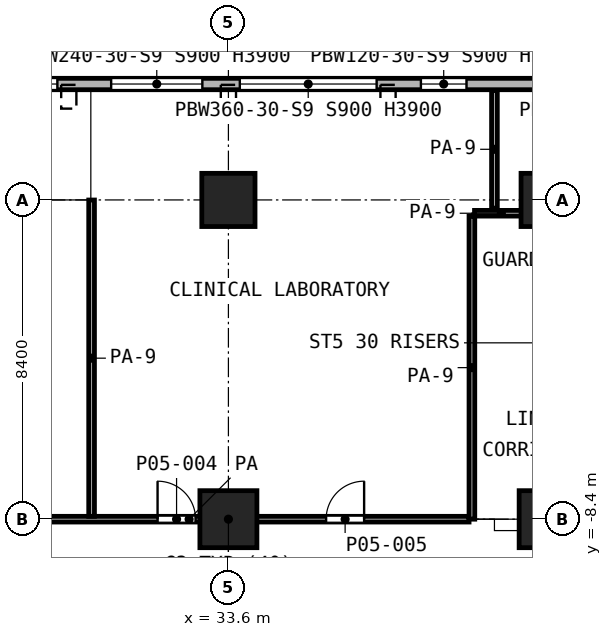
"""IFC4 building model, lengths in metres.
Left out: names, types, materials, properties, quantities, classifications, styles, units other than length and angle.
Written with IfcOpenShell. Run it as: python <this file> out.ifc"""

import sys

from ifc_helpers import new_model, si_unit, direction, frame, frame_2d, origin, origin_2d, place, context, subcontext, project, spatial, rectangle, extrude, element, fill, save


model = new_model("IFC4")
c1 = context("Model", 3, precision=1e-05, world=origin(), true_north=direction((0.0, 1.0)))
c2 = subcontext(c1, "Body", "Model", "MODEL_VIEW")
j1 = project(units=[si_unit("LENGTHUNIT", "METRE"), si_unit("PLANEANGLEUNIT", "RADIAN")], contexts=[c1])
p1 = place(None, origin())
s1 = spatial("IfcSite", under=j1, at=p1, CompositionType="ELEMENT")
p2 = place(p1, origin())
s2 = spatial("IfcBuilding", under=s1, at=p2, CompositionType="ELEMENT")
p3 = place(p2, frame((0.0, 0.0, 23.8)))
s3 = spatial("IfcBuildingStorey", under=s2, at=p3, CompositionType="ELEMENT", Elevation=23.8)
for number, where, z_axis, x_axis in (
    (1, (33.6, 0.0, 0.0), (0.0, 0.0, 1.0), (1.0, 0.0, 0.0)),
    (2, (42.0, 0.0, 0.0), (0.0, 0.0, 1.0), (1.0, 0.0, 0.0)),
):
    element("IfcColumn", number, at=place(p3, frame(where, z_axis=z_axis, x_axis=x_axis)), inside=s3, PredefinedType="COLUMN", context=c2, shape_type="SweptSolid", body=[
        extrude(rectangle(XDim=1.4, YDim=1.4, at=origin_2d()), origin(), (0.0, 0.0, 1.0), 5.2),
    ])
for number, where, z_axis, x_axis in (
    (3, (33.6, -8.4, 0.0), (0.0, 0.0, 1.0), (1.0, 0.0, 0.0)),
    (4, (42.0, -8.4, 0.0), (0.0, 0.0, 1.0), (1.0, 0.0, 0.0)),
):
    element("IfcColumn", number, at=place(p3, frame(where, z_axis=z_axis, x_axis=x_axis)), inside=s3, PredefinedType="COLUMN", context=c2, shape_type="SweptSolid", body=[
        extrude(rectangle(XDim=1.5, YDim=1.5, at=origin_2d()), origin(), (0.0, 0.0, 1.0), 5.2),
    ])
p4 = place(p3, frame((89.538, 3.05, 0.0), z_axis=(0.0, 0.0, 1.0), x_axis=(-1.0, 0.0, 0.0)))
e5 = element("IfcWall", 5, at=p4, inside=s3, PredefinedType="SOLIDWALL", context=c2, shape_type="SweptSolid", body=[
    extrude(rectangle(XDim=86.676, YDim=0.3, at=frame_2d((43.338, 0.0))), origin(), (0.0, 0.0, 1.0), 4.85),
])
p5 = place(p4, frame((1.638, 0.0, 0.9)))
e6 = element("IfcOpeningElement", 6, at=p5, cuts=e5, PredefinedType="OPENING", context=c2, shape_type="SweptSolid", body=[
    extrude(rectangle(XDim=3.6, YDim=3.0, at=frame_2d((1.8, 1.5))), frame((0.0, 0.16, 0.0), z_axis=(0.0, -1.0, 0.0), x_axis=(1.0, 0.0, 0.0)), (0.0, 0.0, 1.0), 0.32),
])
p6 = place(p4, frame((5.838, 0.0, 0.9)))
e7 = element("IfcOpeningElement", 7, at=p6, cuts=e5, PredefinedType="OPENING", context=c2, shape_type="SweptSolid", body=[
    extrude(rectangle(XDim=3.6, YDim=3.0, at=frame_2d((1.8, 1.5))), frame((0.0, 0.16, 0.0), z_axis=(0.0, -1.0, 0.0), x_axis=(1.0, 0.0, 0.0)), (0.0, 0.0, 1.0), 0.32),
])
p7 = place(p4, frame((10.723, 0.0, 0.9)))
e8 = element("IfcOpeningElement", 8, at=p7, cuts=e5, PredefinedType="OPENING", context=c2, shape_type="SweptSolid", body=[
    extrude(rectangle(XDim=2.4, YDim=3.0, at=frame_2d((1.2, 1.5))), frame((0.0, 0.16, 0.0), z_axis=(0.0, -1.0, 0.0), x_axis=(1.0, 0.0, 0.0)), (0.0, 0.0, 1.0), 0.32),
])
p8 = place(p4, frame((14.623, 0.0, 0.9)))
e9 = element("IfcOpeningElement", 9, at=p8, cuts=e5, PredefinedType="OPENING", context=c2, shape_type="SweptSolid", body=[
    extrude(rectangle(XDim=2.4, YDim=3.0, at=frame_2d((1.2, 1.5))), frame((0.0, 0.16, 0.0), z_axis=(0.0, -1.0, 0.0), x_axis=(1.0, 0.0, 0.0)), (0.0, 0.0, 1.0), 0.32),
])
p9 = place(p4, frame((18.438, 0.0, 0.9)))
e10 = element("IfcOpeningElement", 10, at=p9, cuts=e5, PredefinedType="OPENING", context=c2, shape_type="SweptSolid", body=[
    extrude(rectangle(XDim=3.6, YDim=3.0, at=frame_2d((1.8, 1.5))), frame((0.0, 0.16, 0.0), z_axis=(0.0, -1.0, 0.0), x_axis=(1.0, 0.0, 0.0)), (0.0, 0.0, 1.0), 0.32),
])
p10 = place(p4, frame((22.638, 0.0, 0.9)))
e11 = element("IfcOpeningElement", 11, at=p10, cuts=e5, PredefinedType="OPENING", context=c2, shape_type="SweptSolid", body=[
    extrude(rectangle(XDim=3.6, YDim=3.0, at=frame_2d((1.8, 1.5))), frame((0.0, 0.16, 0.0), z_axis=(0.0, -1.0, 0.0), x_axis=(1.0, 0.0, 0.0)), (0.0, 0.0, 1.0), 0.32),
])
p11 = place(p4, frame((26.838, 0.0, 0.9)))
e12 = element("IfcOpeningElement", 12, at=p11, cuts=e5, PredefinedType="OPENING", context=c2, shape_type="SweptSolid", body=[
    extrude(rectangle(XDim=3.6, YDim=3.0, at=frame_2d((1.8, 1.5))), frame((0.0, 0.16, 0.0), z_axis=(0.0, -1.0, 0.0), x_axis=(1.0, 0.0, 0.0)), (0.0, 0.0, 1.0), 0.32),
])
p12 = place(p4, frame((31.038, 0.0, 0.9)))
e13 = element("IfcOpeningElement", 13, at=p12, cuts=e5, PredefinedType="OPENING", context=c2, shape_type="SweptSolid", body=[
    extrude(rectangle(XDim=3.6, YDim=3.0, at=frame_2d((1.8, 1.5))), frame((0.0, 0.16, 0.0), z_axis=(0.0, -1.0, 0.0), x_axis=(1.0, 0.0, 0.0)), (0.0, 0.0, 1.0), 0.32),
])
p13 = place(p4, frame((35.238, 0.0, 0.9)))
e14 = element("IfcOpeningElement", 14, at=p13, cuts=e5, PredefinedType="OPENING", context=c2, shape_type="SweptSolid", body=[
    extrude(rectangle(XDim=3.6, YDim=3.0, at=frame_2d((1.8, 1.5))), frame((0.0, 0.16, 0.0), z_axis=(0.0, -1.0, 0.0), x_axis=(1.0, 0.0, 0.0)), (0.0, 0.0, 1.0), 0.32),
])
p14 = place(p4, frame((39.438, 0.0, 0.9)))
e15 = element("IfcOpeningElement", 15, at=p14, cuts=e5, PredefinedType="OPENING", context=c2, shape_type="SweptSolid", body=[
    extrude(rectangle(XDim=3.6, YDim=3.0, at=frame_2d((1.8, 1.5))), frame((0.0, 0.16, 0.0), z_axis=(0.0, -1.0, 0.0), x_axis=(1.0, 0.0, 0.0)), (0.0, 0.0, 1.0), 0.32),
])
p15 = place(p4, frame((43.638, 0.0, 0.9)))
e16 = element("IfcOpeningElement", 16, at=p15, cuts=e5, PredefinedType="OPENING", context=c2, shape_type="SweptSolid", body=[
    extrude(rectangle(XDim=3.6, YDim=3.0, at=frame_2d((1.8, 1.5))), frame((0.0, 0.16, 0.0), z_axis=(0.0, -1.0, 0.0), x_axis=(1.0, 0.0, 0.0)), (0.0, 0.0, 1.0), 0.32),
])
p16 = place(p4, frame((49.673, 0.0, 0.9)))
e17 = element("IfcOpeningElement", 17, at=p16, cuts=e5, PredefinedType="OPENING", context=c2, shape_type="SweptSolid", body=[
    extrude(rectangle(XDim=1.2, YDim=3.0, at=frame_2d((0.6, 1.5))), frame((0.0, 0.16, 0.0), z_axis=(0.0, -1.0, 0.0), x_axis=(1.0, 0.0, 0.0)), (0.0, 0.0, 1.0), 0.32),
])
p17 = place(p4, frame((52.038, 0.0, 0.9)))
e18 = element("IfcOpeningElement", 18, at=p17, cuts=e5, PredefinedType="OPENING", context=c2, shape_type="SweptSolid", body=[
    extrude(rectangle(XDim=3.6, YDim=3.0, at=frame_2d((1.8, 1.5))), frame((0.0, 0.16, 0.0), z_axis=(0.0, -1.0, 0.0), x_axis=(1.0, 0.0, 0.0)), (0.0, 0.0, 1.0), 0.32),
])
p18 = place(p4, frame((56.623, 0.0, 0.9)))
e19 = element("IfcOpeningElement", 19, at=p18, cuts=e5, PredefinedType="OPENING", context=c2, shape_type="SweptSolid", body=[
    extrude(rectangle(XDim=2.4, YDim=3.0, at=frame_2d((1.2, 1.5))), frame((0.0, 0.16, 0.0), z_axis=(0.0, -1.0, 0.0), x_axis=(1.0, 0.0, 0.0)), (0.0, 0.0, 1.0), 0.32),
])
p19 = place(p4, frame((60.438, 0.0, 0.9)))
e20 = element("IfcOpeningElement", 20, at=p19, cuts=e5, PredefinedType="OPENING", context=c2, shape_type="SweptSolid", body=[
    extrude(rectangle(XDim=3.6, YDim=3.0, at=frame_2d((1.8, 1.5))), frame((0.0, 0.16, 0.0), z_axis=(0.0, -1.0, 0.0), x_axis=(1.0, 0.0, 0.0)), (0.0, 0.0, 1.0), 0.32),
])
p20 = place(p4, frame((64.638, 0.0, 0.9)))
e21 = element("IfcOpeningElement", 21, at=p20, cuts=e5, PredefinedType="OPENING", context=c2, shape_type="SweptSolid", body=[
    extrude(rectangle(XDim=3.6, YDim=3.0, at=frame_2d((1.8, 1.5))), frame((0.0, 0.16, 0.0), z_axis=(0.0, -1.0, 0.0), x_axis=(1.0, 0.0, 0.0)), (0.0, 0.0, 1.0), 0.32),
])
p21 = place(p4, frame((68.838, 0.0, 0.9)))
e22 = element("IfcOpeningElement", 22, at=p21, cuts=e5, PredefinedType="OPENING", context=c2, shape_type="SweptSolid", body=[
    extrude(rectangle(XDim=3.6, YDim=3.0, at=frame_2d((1.8, 1.5))), frame((0.0, 0.16, 0.0), z_axis=(0.0, -1.0, 0.0), x_axis=(1.0, 0.0, 0.0)), (0.0, 0.0, 1.0), 0.32),
])
p22 = place(p4, frame((73.038, 0.0, 0.9)))
e23 = element("IfcOpeningElement", 23, at=p22, cuts=e5, PredefinedType="OPENING", context=c2, shape_type="SweptSolid", body=[
    extrude(rectangle(XDim=3.6, YDim=3.0, at=frame_2d((1.8, 1.5))), frame((0.0, 0.16, 0.0), z_axis=(0.0, -1.0, 0.0), x_axis=(1.0, 0.0, 0.0)), (0.0, 0.0, 1.0), 0.32),
])
p23 = place(p4, frame((77.238, 0.0, 0.9)))
e24 = element("IfcOpeningElement", 24, at=p23, cuts=e5, PredefinedType="OPENING", context=c2, shape_type="SweptSolid", body=[
    extrude(rectangle(XDim=3.6, YDim=3.0, at=frame_2d((1.8, 1.5))), frame((0.0, 0.16, 0.0), z_axis=(0.0, -1.0, 0.0), x_axis=(1.0, 0.0, 0.0)), (0.0, 0.0, 1.0), 0.32),
])
p24 = place(p4, frame((81.438, 0.0, 0.9)))
e25 = element("IfcOpeningElement", 25, at=p24, cuts=e5, PredefinedType="OPENING", context=c2, shape_type="SweptSolid", body=[
    extrude(rectangle(XDim=3.6, YDim=3.0, at=frame_2d((1.8, 1.5))), frame((0.0, 0.16, 0.0), z_axis=(0.0, -1.0, 0.0), x_axis=(1.0, 0.0, 0.0)), (0.0, 0.0, 1.0), 0.32),
])
p25 = place(p3, frame((25.2, -8.4, 0.0), z_axis=(0.0, 0.0, 1.0), x_axis=(1.0, 0.0, 0.0)))
e26 = element("IfcWall", 26, at=p25, inside=s3, PredefinedType="PARTITIONING", context=c2, shape_type="SweptSolid", body=[
    extrude(rectangle(XDim=14.732, YDim=0.15, at=frame_2d((7.366, 0.0))), origin(), (0.0, 0.0, 1.0), 4.85),
])
p26 = place(p25, frame((1.8, 0.0, 0.0)))
e27 = element("IfcOpeningElement", 27, at=p26, cuts=e26, PredefinedType="OPENING", context=c2, shape_type="SweptSolid", body=[
    extrude(rectangle(XDim=1.2, YDim=2.1, at=frame_2d((0.6, 1.05))), frame((0.0, 0.085, 0.0), z_axis=(0.0, -1.0, 0.0), x_axis=(1.0, 0.0, 0.0)), (0.0, 0.0, 1.0), 0.17),
])
p27 = place(p25, frame((6.536, 0.0, 0.0)))
e28 = element("IfcOpeningElement", 28, at=p27, cuts=e26, PredefinedType="OPENING", context=c2, shape_type="SweptSolid", body=[
    extrude(rectangle(XDim=1.0, YDim=2.1, at=frame_2d((0.5, 1.05))), frame((0.0, 0.085, 0.0), z_axis=(0.0, -1.0, 0.0), x_axis=(1.0, 0.0, 0.0)), (0.0, 0.0, 1.0), 0.17),
])
p28 = place(p25, frame((10.971, 0.0, 0.0)))
e29 = element("IfcOpeningElement", 29, at=p28, cuts=e26, PredefinedType="OPENING", context=c2, shape_type="SweptSolid", body=[
    extrude(rectangle(XDim=1.0, YDim=2.1, at=frame_2d((0.5, 1.05))), frame((0.0, 0.085, 0.0), z_axis=(0.0, -1.0, 0.0), x_axis=(1.0, 0.0, 0.0)), (0.0, 0.0, 1.0), 0.17),
])
p29 = place(p3, frame((40.076, -0.35, 0.0), z_axis=(0.0, 0.0, 1.0), x_axis=(1.0, 0.0, 0.0)))
e30 = element("IfcWall", 30, at=p29, inside=s3, PredefinedType="PARTITIONING", context=c2, shape_type="SweptSolid", body=[
    extrude(rectangle(XDim=1.412, YDim=0.15, at=frame_2d((0.706, 0.0))), origin(), (0.0, 0.0, 1.0), 3.45),
])
p30 = place(p3, frame((30.0, -8.325, 0.0), z_axis=(0.0, 0.0, 1.0), x_axis=(0.0, 1.0, 0.0)))
e31 = element("IfcWall", 31, at=p30, inside=s3, PredefinedType="PARTITIONING", context=c2, shape_type="SweptSolid", body=[
    extrude(rectangle(XDim=8.323, YDim=0.15, at=frame_2d((4.162, 0.0))), origin(), (0.0, 0.0, 1.0), 3.45),
])
p31 = place(p3, frame((40.007, -8.4, 0.0), z_axis=(0.0, 0.0, 1.0), x_axis=(0.0, 1.0, 0.0)))
e32 = element("IfcWall", 32, at=p31, inside=s3, PredefinedType="PARTITIONING", context=c2, shape_type="SweptSolid", body=[
    extrude(rectangle(XDim=7.975, YDim=0.15, at=frame_2d((3.987, 0.0))), origin(), (0.0, 0.0, 1.0), 3.45),
])
p32 = place(p3, frame((40.6, -0.215, 0.0), z_axis=(0.0, 0.0, 1.0), x_axis=(0.0, 1.0, 0.0)))
e33 = element("IfcWall", 33, at=p32, inside=s3, PredefinedType="PARTITIONING", context=c2, shape_type="SweptSolid", body=[
    extrude(rectangle(XDim=3.095, YDim=0.15, at=frame_2d((1.547, 0.0))), origin(), (0.0, 0.0, 1.0), 3.45),
])
p33 = place(p16, origin())
e34 = element("IfcWindow", 34, at=p33, inside=s3, PartitioningType="SINGLE_PANEL", PredefinedType="WINDOW", context=c2, shape_type="SweptSolid", body=[
    extrude(rectangle(XDim=1.2, YDim=3.0, at=frame_2d((0.6, 1.5))), frame((0.0, 0.03, 0.0), z_axis=(0.0, -1.0, 0.0), x_axis=(1.0, 0.0, 0.0)), (0.0, 0.0, 1.0), 0.06),
])
fill(e17, e34)
p34 = place(p17, origin())
e35 = element("IfcWindow", 35, at=p34, inside=s3, PartitioningType="SINGLE_PANEL", PredefinedType="WINDOW", context=c2, shape_type="SweptSolid", body=[
    extrude(rectangle(XDim=3.6, YDim=3.0, at=frame_2d((1.8, 1.5))), frame((0.0, 0.03, 0.0), z_axis=(0.0, -1.0, 0.0), x_axis=(1.0, 0.0, 0.0)), (0.0, 0.0, 1.0), 0.06),
])
fill(e18, e35)
p35 = place(p18, origin())
e36 = element("IfcWindow", 36, at=p35, inside=s3, PartitioningType="SINGLE_PANEL", PredefinedType="WINDOW", context=c2, shape_type="SweptSolid", body=[
    extrude(rectangle(XDim=2.4, YDim=3.0, at=frame_2d((1.2, 1.5))), frame((0.0, 0.03, 0.0), z_axis=(0.0, -1.0, 0.0), x_axis=(1.0, 0.0, 0.0)), (0.0, 0.0, 1.0), 0.06),
])
fill(e19, e36)
p36 = place(p19, origin())
e37 = element("IfcWindow", 37, at=p36, inside=s3, PartitioningType="SINGLE_PANEL", PredefinedType="WINDOW", context=c2, shape_type="SweptSolid", body=[
    extrude(rectangle(XDim=3.6, YDim=3.0, at=frame_2d((1.8, 1.5))), frame((0.0, 0.03, 0.0), z_axis=(0.0, -1.0, 0.0), x_axis=(1.0, 0.0, 0.0)), (0.0, 0.0, 1.0), 0.06),
])
fill(e20, e37)
p37 = place(p27, origin())
e38 = element("IfcDoor", 38, at=p37, inside=s3, OperationType="SINGLE_SWING_LEFT", PredefinedType="DOOR", context=c2, shape_type="SweptSolid", body=[
    extrude(rectangle(XDim=1.0, YDim=2.1, at=frame_2d((0.5, 1.05))), frame((0.0, 0.025, 0.0), z_axis=(0.0, -1.0, 0.0), x_axis=(1.0, 0.0, 0.0)), (0.0, 0.0, 1.0), 0.05),
])
fill(e28, e38)
p38 = place(p28, origin())
e39 = element("IfcDoor", 39, at=p38, inside=s3, OperationType="SINGLE_SWING_RIGHT", PredefinedType="DOOR", context=c2, shape_type="SweptSolid", body=[
    extrude(rectangle(XDim=1.0, YDim=2.1, at=frame_2d((0.5, 1.05))), frame((0.0, 0.025, 0.0), z_axis=(0.0, -1.0, 0.0), x_axis=(1.0, 0.0, 0.0)), (0.0, 0.0, 1.0), 0.05),
])
fill(e29, e39)
save(model, sys.argv[1])
